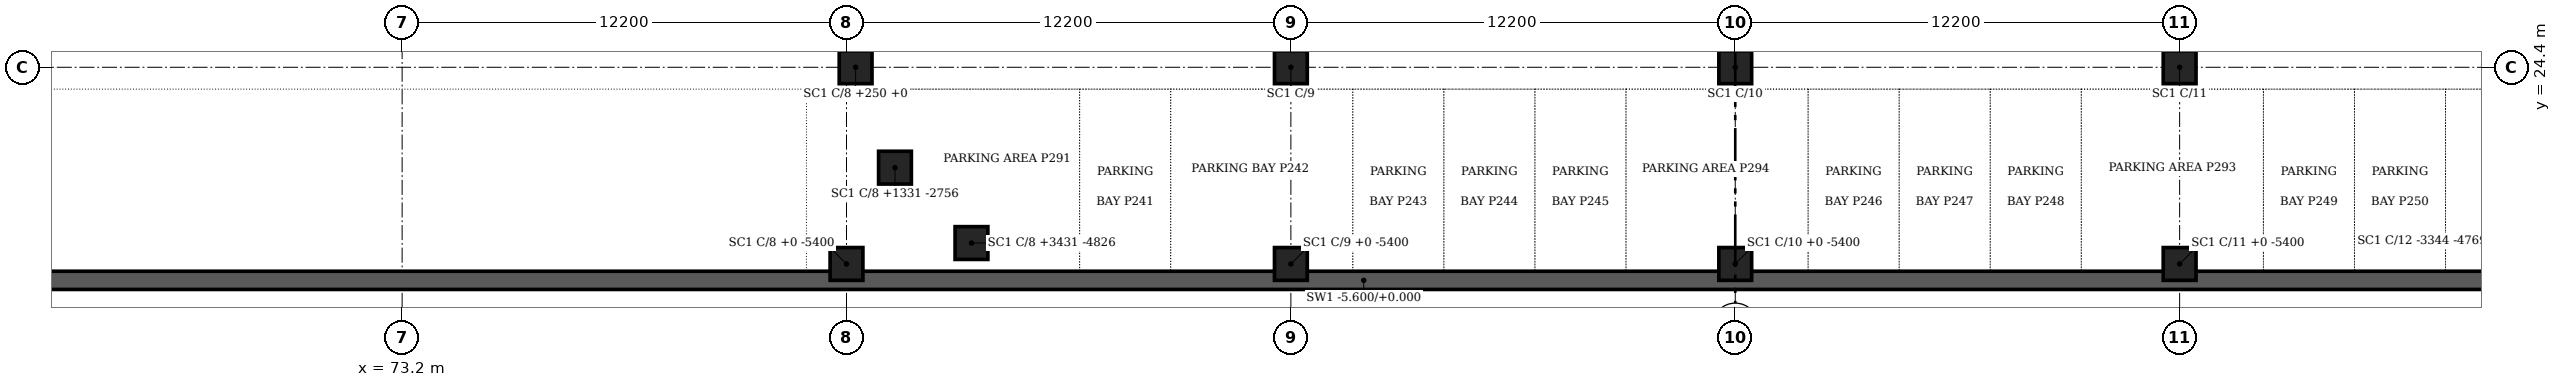
"""IFC4 building model, lengths in metres.
Left out: names, types, materials, properties, quantities, classifications, styles, units other than length and angle.
Written with IfcOpenShell. Run it as: python <this file> out.ifc"""

import sys

from ifc_helpers import new_model, si_unit, direction, frame, origin, origin_2d, place, context, subcontext, project, spatial, polyline, rectangle, outline, extrude, element, save


model = new_model("IFC4")
c1 = context("Model", 3, precision=1e-05, world=origin(), true_north=direction((0.0, 1.0)))
c2 = subcontext(c1, "Body", "Model", "MODEL_VIEW")
j1 = project(units=[si_unit("LENGTHUNIT", "METRE"), si_unit("PLANEANGLEUNIT", "RADIAN")], contexts=[c1])
p1 = place(None, origin())
s1 = spatial("IfcSite", under=j1, at=p1, CompositionType="ELEMENT")
p2 = place(p1, origin())
s2 = spatial("IfcBuilding", under=s1, at=p2, CompositionType="ELEMENT")
p3 = place(p2, frame((0.0, 0.0, -5.4)))
s3 = spatial("IfcBuildingStorey", under=s2, at=p3, CompositionType="ELEMENT", Elevation=-5.4)
p4 = place(p3, frame((0.0, 0.0, -0.2)))
e1 = element("IfcWall", 1, at=p4, inside=s3, PredefinedType="SOLIDWALL", context=c2, shape_type="SweptSolid", body=[
    extrude(outline(polyline([(60.5, 18.8), (61.0, 18.3), (138.7, 18.3), (138.2, 18.8), (60.5, 18.8)])), origin(), (0.0, 0.0, 1.0), 5.6),
])
for number, where, z_axis, x_axis in (
    (2, (85.65, 24.4, 0.0), (0.0, 0.0, 1.0), (1.0, 0.0, 0.0)),
    (3, (86.731, 21.644, 0.0), (0.0, 0.0, 1.0), (1.0, 0.0, 0.0)),
    (4, (88.831, 19.574, 0.0), (0.0, 0.0, 1.0), (1.0, 0.0, 0.0)),
    (5, (97.6, 24.4, 0.0), (0.0, 0.0, 1.0), (1.0, 0.0, 0.0)),
    (6, (109.8, 24.4, 0.0), (0.0, 0.0, 1.0), (1.0, 0.0, 0.0)),
    (7, (122.0, 24.4, 0.0), (0.0, 0.0, 1.0), (1.0, 0.0, 0.0)),
    (8, (73.2, 24.4, 0.0), (0.0, 0.0, 1.0), (1.0, 0.0, 0.0)),
    (9, (73.2, 19.0, 0.0), (0.0, 0.0, 1.0), (1.0, 0.0, 0.0)),
    (10, (85.4, 19.0, 0.0), (0.0, 0.0, 1.0), (1.0, 0.0, 0.0)),
    (11, (97.6, 19.0, 0.0), (0.0, 0.0, 1.0), (1.0, 0.0, 0.0)),
    (12, (109.8, 19.0, 0.0), (0.0, 0.0, 1.0), (1.0, 0.0, 0.0)),
    (13, (122.0, 19.0, 0.0), (0.0, 0.0, 1.0), (1.0, 0.0, 0.0)),
):
    element("IfcColumn", number, at=place(p3, frame(where, z_axis=z_axis, x_axis=x_axis)), inside=s3, PredefinedType="COLUMN", context=c2, shape_type="SweptSolid", body=[
        extrude(rectangle(XDim=0.9, YDim=0.9, at=origin_2d()), origin(), (0.0, 0.0, 1.0), 5.15),
    ])
save(model, sys.argv[1])
